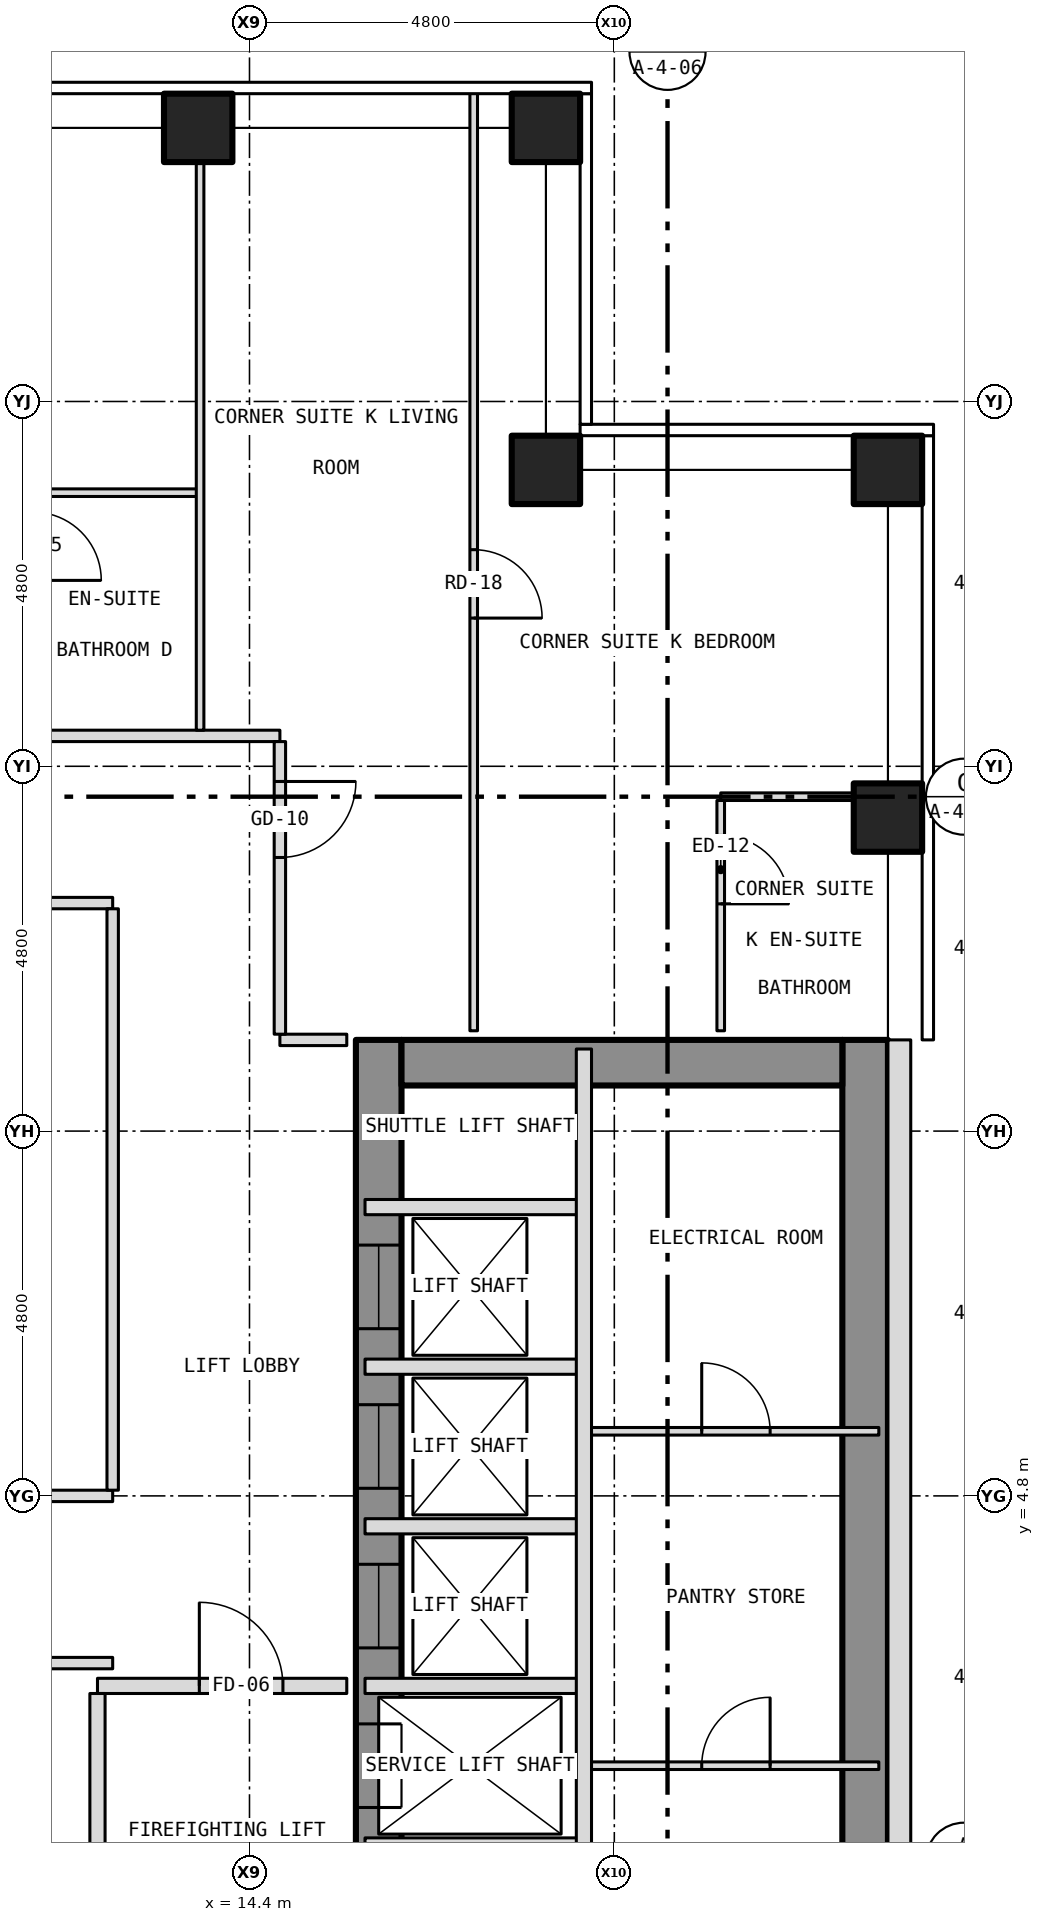
"""IFC4 building model, lengths in metres.
Left out: names, types, materials, properties, quantities, classifications, styles, units other than length and angle.
Written with IfcOpenShell. Run it as: python <this file> out.ifc"""

import sys

from ifc_helpers import new_model, si_unit, direction, frame, frame_2d, origin, origin_2d, place, context, subcontext, project, spatial, rectangle, hollow_rectangle, extrude, element, fill, save


model = new_model("IFC4")
c1 = context("Model", 3, precision=1e-05, world=origin(), true_north=direction((0.0, 1.0)))
c2 = subcontext(c1, "Body", "Model", "MODEL_VIEW")
j1 = project(units=[si_unit("LENGTHUNIT", "METRE"), si_unit("PLANEANGLEUNIT", "RADIAN")], contexts=[c1])
p1 = place(None, origin())
s1 = spatial("IfcSite", under=j1, at=p1, CompositionType="ELEMENT")
p2 = place(p1, origin())
s2 = spatial("IfcBuilding", under=s1, at=p2, CompositionType="ELEMENT")
p3 = place(p2, frame((0.0, 0.0, 110.0)))
s3 = spatial("IfcBuildingStorey", under=s2, at=p3, CompositionType="ELEMENT", Elevation=110.0)
for number, where, z_axis, x_axis in (
    (1, (13.725, 22.8, -0.15), (0.0, 0.0, 1.0), (1.0, 0.0, 0.0)),
    (2, (18.3, 22.8, -0.15), (0.0, 0.0, 1.0), (1.0, 0.0, 0.0)),
    (3, (22.8, 13.725, -0.15), (0.0, 0.0, 1.0), (1.0, 0.0, 0.0)),
    (4, (22.8, 18.3, -0.15), (0.0, 0.0, 1.0), (1.0, 0.0, 0.0)),
    (5, (18.3, 18.3, -0.15), (0.0, 0.0, 1.0), (1.0, 0.0, 0.0)),
):
    element("IfcColumn", number, at=place(p3, frame(where, z_axis=z_axis, x_axis=x_axis)), inside=s3, PredefinedType="COLUMN", context=c2, shape_type="SweptSolid", body=[
        extrude(hollow_rectangle(XDim=0.9, YDim=0.9, WallThickness=0.05, at=origin_2d()), origin(), (0.0, 0.0, 1.0), 3.5),
    ])
p4 = place(p3, frame((16.1, -10.8, 0.0), z_axis=(0.0, 0.0, 1.0), x_axis=(0.0, 1.0, 0.0)))
e6 = element("IfcWall", 6, at=p4, inside=s3, PredefinedType="SHEAR", context=c2, shape_type="SweptSolid", body=[
    extrude(rectangle(XDim=21.6, YDim=0.6, at=frame_2d((10.8, 0.0))), origin(), (0.0, 0.0, 1.0), 3.25),
])
p5 = place(p4, frame((9.4, 0.0, 0.0)))
e7 = element("IfcOpeningElement", 7, at=p5, cuts=e6, PredefinedType="OPENING", context=c2, shape_type="SweptSolid", body=[
    extrude(rectangle(XDim=1.1, YDim=2.1, at=frame_2d((0.55, 1.05))), frame((0.0, 0.312, 0.0), z_axis=(0.0, -1.0, 0.0), x_axis=(1.0, 0.0, 0.0)), (0.0, 0.0, 1.0), 0.624),
])
p6 = place(p4, frame((11.5, 0.0, 0.0)))
e8 = element("IfcOpeningElement", 8, at=p6, cuts=e6, PredefinedType="OPENING", context=c2, shape_type="SweptSolid", body=[
    extrude(rectangle(XDim=1.1, YDim=2.1, at=frame_2d((0.55, 1.05))), frame((0.0, 0.312, 0.0), z_axis=(0.0, -1.0, 0.0), x_axis=(1.0, 0.0, 0.0)), (0.0, 0.0, 1.0), 0.624),
])
p7 = place(p4, frame((13.6, 0.0, 0.0)))
e9 = element("IfcOpeningElement", 9, at=p7, cuts=e6, PredefinedType="OPENING", context=c2, shape_type="SweptSolid", body=[
    extrude(rectangle(XDim=1.1, YDim=2.1, at=frame_2d((0.55, 1.05))), frame((0.0, 0.312, 0.0), z_axis=(0.0, -1.0, 0.0), x_axis=(1.0, 0.0, 0.0)), (0.0, 0.0, 1.0), 0.624),
])
p8 = place(p4, frame((15.7, 0.0, 0.0)))
e10 = element("IfcOpeningElement", 10, at=p8, cuts=e6, PredefinedType="OPENING", context=c2, shape_type="SweptSolid", body=[
    extrude(rectangle(XDim=1.1, YDim=2.1, at=frame_2d((0.55, 1.05))), frame((0.0, 0.312, 0.0), z_axis=(0.0, -1.0, 0.0), x_axis=(1.0, 0.0, 0.0)), (0.0, 0.0, 1.0), 0.624),
])
p9 = place(p4, frame((17.8, 0.0, 0.0)))
e11 = element("IfcOpeningElement", 11, at=p9, cuts=e6, PredefinedType="OPENING", context=c2, shape_type="SweptSolid", body=[
    extrude(rectangle(XDim=1.1, YDim=2.1, at=frame_2d((0.55, 1.05))), frame((0.0, 0.312, 0.0), z_axis=(0.0, -1.0, 0.0), x_axis=(1.0, 0.0, 0.0)), (0.0, 0.0, 1.0), 0.624),
])
p10 = place(p4, frame((5.642, 0.0, 0.0)))
e12 = element("IfcOpeningElement", 12, at=p10, cuts=e6, PredefinedType="OPENING", context=c2, shape_type="SweptSolid", body=[
    extrude(rectangle(XDim=1.1, YDim=2.1, at=frame_2d((0.55, 1.05))), frame((0.0, 0.312, 0.0), z_axis=(0.0, -1.0, 0.0), x_axis=(1.0, 0.0, 0.0)), (0.0, 0.0, 1.0), 0.624),
])
p11 = place(p4, frame((7.5, 0.0, 0.0)))
e13 = element("IfcOpeningElement", 13, at=p11, cuts=e6, PredefinedType="OPENING", context=c2, shape_type="SweptSolid", body=[
    extrude(rectangle(XDim=1.1, YDim=2.1, at=frame_2d((0.55, 1.05))), frame((0.0, 0.312, 0.0), z_axis=(0.0, -1.0, 0.0), x_axis=(1.0, 0.0, 0.0)), (0.0, 0.0, 1.0), 0.624),
])
p12 = place(p3, frame((22.5, -10.8, 0.0), z_axis=(0.0, 0.0, 1.0), x_axis=(0.0, 1.0, 0.0)))
e14 = element("IfcWall", 14, at=p12, inside=s3, PredefinedType="SHEAR", context=c2, shape_type="SweptSolid", body=[
    extrude(rectangle(XDim=21.6, YDim=0.6, at=frame_2d((10.8, 0.0))), origin(), (0.0, 0.0, 1.0), 3.25),
])
p13 = place(p3, frame((16.4, 10.5, 0.0), z_axis=(0.0, 0.0, 1.0), x_axis=(1.0, 0.0, 0.0)))
e15 = element("IfcWall", 15, at=p13, inside=s3, PredefinedType="SHEAR", context=c2, shape_type="SweptSolid", body=[
    extrude(rectangle(XDim=5.8, YDim=0.6, at=frame_2d((2.9, 0.0))), origin(), (0.0, 0.0, 1.0), 3.25),
])
p14 = place(p3, frame((22.95, -10.8, 0.0), z_axis=(0.0, 0.0, 1.0), x_axis=(0.0, 1.0, 0.0)))
e16 = element("IfcWall", 16, at=p14, inside=s3, PredefinedType="SOLIDWALL", context=c2, shape_type="SweptSolid", body=[
    extrude(rectangle(XDim=21.6, YDim=0.3, at=frame_2d((10.8, 0.0))), origin(), (0.0, 0.0, 1.0), 3.5),
])
p15 = place(p14, frame((2.95, 0.0, 1.0)))
e17 = element("IfcOpeningElement", 17, at=p15, cuts=e16, PredefinedType="OPENING", context=c2, shape_type="SweptSolid", body=[
    extrude(rectangle(XDim=0.6, YDim=1.5, at=frame_2d((0.3, 0.75))), frame((0.0, 0.162, 0.0), z_axis=(0.0, -1.0, 0.0), x_axis=(1.0, 0.0, 0.0)), (0.0, 0.0, 1.0), 0.324),
])
p16 = place(p3, frame((15.92, 0.2, 0.0), z_axis=(0.0, 0.0, 1.0), x_axis=(1.0, 0.0, 0.0)))
e18 = element("IfcWall", 18, at=p16, inside=s3, PredefinedType="PARTITIONING", context=c2, shape_type="SweptSolid", body=[
    extrude(rectangle(XDim=2.88, YDim=0.2, at=frame_2d((1.44, 0.0))), origin(), (0.0, 0.0, 1.0), 3.25),
])
p17 = place(p3, frame((18.8, 1.25, 0.0), z_axis=(0.0, 0.0, 1.0), x_axis=(1.0, 0.0, 0.0)))
e19 = element("IfcWall", 19, at=p17, inside=s3, PredefinedType="PARTITIONING", context=c2, shape_type="SweptSolid", body=[
    extrude(rectangle(XDim=3.88, YDim=0.1, at=frame_2d((1.94, 0.0))), origin(), (0.0, 0.0, 1.0), 3.25),
])
p18 = place(p17, frame((1.55, 0.0, 0.0)))
e20 = element("IfcOpeningElement", 20, at=p18, cuts=e19, PredefinedType="OPENING", context=c2, shape_type="SweptSolid", body=[
    extrude(rectangle(XDim=0.9, YDim=2.1, at=frame_2d((0.45, 1.05))), frame((0.0, 0.062, 0.0), z_axis=(0.0, -1.0, 0.0), x_axis=(1.0, 0.0, 0.0)), (0.0, 0.0, 1.0), 0.124),
])
p19 = place(p3, frame((12.4, 2.3, 0.0), z_axis=(0.0, 0.0, 1.0), x_axis=(1.0, 0.0, 0.0)))
e21 = element("IfcWall", 21, at=p19, inside=s3, PredefinedType="PARTITIONING", context=c2, shape_type="SweptSolid", body=[
    extrude(rectangle(XDim=3.28, YDim=0.2, at=frame_2d((1.64, 0.0))), origin(), (0.0, 0.0, 1.0), 3.35),
])
p20 = place(p19, frame((1.34, 0.0, 0.0)))
e22 = element("IfcOpeningElement", 22, at=p20, cuts=e21, PredefinedType="OPENING", context=c2, shape_type="SweptSolid", body=[
    extrude(rectangle(XDim=1.1, YDim=2.1, at=frame_2d((0.55, 1.05))), frame((0.0, 0.112, 0.0), z_axis=(0.0, -1.0, 0.0), x_axis=(1.0, 0.0, 0.0)), (0.0, 0.0, 1.0), 0.224),
])
p21 = place(p3, frame((15.92, 2.3, 0.0), z_axis=(0.0, 0.0, 1.0), x_axis=(1.0, 0.0, 0.0)))
e23 = element("IfcWall", 23, at=p21, inside=s3, PredefinedType="PARTITIONING", context=c2, shape_type="SweptSolid", body=[
    extrude(rectangle(XDim=2.88, YDim=0.2, at=frame_2d((1.44, 0.0))), origin(), (0.0, 0.0, 1.0), 3.25),
])
p22 = place(p3, frame((6.3, 2.6, 0.0), z_axis=(0.0, 0.0, 1.0), x_axis=(1.0, 0.0, 0.0)))
e24 = element("IfcWall", 24, at=p22, inside=s3, PredefinedType="PARTITIONING", context=c2, shape_type="SweptSolid", body=[
    extrude(rectangle(XDim=6.3, YDim=0.15, at=frame_2d((3.15, 0.0))), origin(), (0.0, 0.0, 1.0), 3.35),
])
p23 = place(p3, frame((15.92, 4.4, 0.0), z_axis=(0.0, 0.0, 1.0), x_axis=(1.0, 0.0, 0.0)))
e25 = element("IfcWall", 25, at=p23, inside=s3, PredefinedType="PARTITIONING", context=c2, shape_type="SweptSolid", body=[
    extrude(rectangle(XDim=2.88, YDim=0.2, at=frame_2d((1.44, 0.0))), origin(), (0.0, 0.0, 1.0), 3.25),
])
p24 = place(p3, frame((6.3, 4.8, 0.0), z_axis=(0.0, 0.0, 1.0), x_axis=(1.0, 0.0, 0.0)))
e26 = element("IfcWall", 26, at=p24, inside=s3, PredefinedType="PARTITIONING", context=c2, shape_type="SweptSolid", body=[
    extrude(rectangle(XDim=6.3, YDim=0.15, at=frame_2d((3.15, 0.0))), origin(), (0.0, 0.0, 1.0), 3.35),
])
p25 = place(p3, frame((18.8, 5.65, 0.0), z_axis=(0.0, 0.0, 1.0), x_axis=(1.0, 0.0, 0.0)))
e27 = element("IfcWall", 27, at=p25, inside=s3, PredefinedType="PARTITIONING", context=c2, shape_type="SweptSolid", body=[
    extrude(rectangle(XDim=3.88, YDim=0.1, at=frame_2d((1.94, 0.0))), origin(), (0.0, 0.0, 1.0), 3.25),
])
p26 = place(p25, frame((1.55, 0.0, 0.0)))
e28 = element("IfcOpeningElement", 28, at=p26, cuts=e27, PredefinedType="OPENING", context=c2, shape_type="SweptSolid", body=[
    extrude(rectangle(XDim=0.9, YDim=2.1, at=frame_2d((0.45, 1.05))), frame((0.0, 0.062, 0.0), z_axis=(0.0, -1.0, 0.0), x_axis=(1.0, 0.0, 0.0)), (0.0, 0.0, 1.0), 0.124),
])
for number, where, z_axis, x_axis in (
    (29, (15.92, 6.5, 0.0), (0.0, 0.0, 1.0), (1.0, 0.0, 0.0)),
    (30, (15.92, 8.6, 0.0), (0.0, 0.0, 1.0), (1.0, 0.0, 0.0)),
):
    element("IfcWall", number, at=place(p3, frame(where, z_axis=z_axis, x_axis=x_axis)), inside=s3, PredefinedType="PARTITIONING", context=c2, shape_type="SweptSolid", body=[
        extrude(rectangle(XDim=2.88, YDim=0.2, at=frame_2d((1.44, 0.0))), origin(), (0.0, 0.0, 1.0), 3.25),
    ])
p27 = place(p3, frame((14.8, 10.8, 0.0), z_axis=(0.0, 0.0, 1.0), x_axis=(1.0, 0.0, 0.0)))
e31 = element("IfcWall", 31, at=p27, inside=s3, PredefinedType="PARTITIONING", context=c2, shape_type="SweptSolid", body=[
    extrude(rectangle(XDim=0.88, YDim=0.15, at=frame_2d((0.44, 0.0))), origin(), (0.0, 0.0, 1.0), 3.35),
])
p28 = place(p3, frame((6.3, 12.6, 0.0), z_axis=(0.0, 0.0, 1.0), x_axis=(1.0, 0.0, 0.0)))
e32 = element("IfcWall", 32, at=p28, inside=s3, PredefinedType="PARTITIONING", context=c2, shape_type="SweptSolid", body=[
    extrude(rectangle(XDim=6.3, YDim=0.15, at=frame_2d((3.15, 0.0))), origin(), (0.0, 0.0, 1.0), 3.35),
])
p29 = place(p3, frame((20.6, 14.0, 0.0), z_axis=(0.0, 0.0, 1.0), x_axis=(1.0, 0.0, 0.0)))
e33 = element("IfcWall", 33, at=p29, inside=s3, PredefinedType="PARTITIONING", context=c2, shape_type="SweptSolid", body=[
    extrude(rectangle(XDim=2.08, YDim=0.1, at=frame_2d((1.04, 0.0))), origin(), (0.0, 0.0, 1.0), 3.35),
])
p30 = place(p3, frame((-14.8, 14.8, 0.0), z_axis=(0.0, 0.0, 1.0), x_axis=(1.0, 0.0, 0.0)))
e34 = element("IfcWall", 34, at=p30, inside=s3, PredefinedType="PARTITIONING", context=c2, shape_type="SweptSolid", body=[
    extrude(rectangle(XDim=29.6, YDim=0.15, at=frame_2d((14.8, 0.0))), origin(), (0.0, 0.0, 1.0), 3.35),
])
p31 = place(p30, frame((2.913, 0.0, 0.0)))
e35 = element("IfcOpeningElement", 35, at=p31, cuts=e34, PredefinedType="OPENING", context=c2, shape_type="SweptSolid", body=[
    extrude(rectangle(XDim=0.9, YDim=2.1, at=frame_2d((0.45, 1.05))), frame((0.0, 0.087, 0.0), z_axis=(0.0, -1.0, 0.0), x_axis=(1.0, 0.0, 0.0)), (0.0, 0.0, 1.0), 0.174),
])
p32 = place(p30, frame((7.481, 0.0, 0.0)))
e36 = element("IfcOpeningElement", 36, at=p32, cuts=e34, PredefinedType="OPENING", context=c2, shape_type="SweptSolid", body=[
    extrude(rectangle(XDim=1.0, YDim=2.1, at=frame_2d((0.5, 1.05))), frame((0.0, 0.087, 0.0), z_axis=(0.0, -1.0, 0.0), x_axis=(1.0, 0.0, 0.0)), (0.0, 0.0, 1.0), 0.174),
])
p33 = place(p30, frame((19.104, 0.0, 0.0)))
e37 = element("IfcOpeningElement", 37, at=p33, cuts=e34, PredefinedType="OPENING", context=c2, shape_type="SweptSolid", body=[
    extrude(rectangle(XDim=1.0, YDim=2.1, at=frame_2d((0.5, 1.05))), frame((0.0, 0.087, 0.0), z_axis=(0.0, -1.0, 0.0), x_axis=(1.0, 0.0, 0.0)), (0.0, 0.0, 1.0), 0.174),
])
p34 = place(p30, frame((23.494, 0.0, 0.0)))
e38 = element("IfcOpeningElement", 38, at=p34, cuts=e34, PredefinedType="OPENING", context=c2, shape_type="SweptSolid", body=[
    extrude(rectangle(XDim=1.0, YDim=2.1, at=frame_2d((0.5, 1.05))), frame((0.0, 0.087, 0.0), z_axis=(0.0, -1.0, 0.0), x_axis=(1.0, 0.0, 0.0)), (0.0, 0.0, 1.0), 0.174),
])
p35 = place(p3, frame((11.55, 18.0, 0.0), z_axis=(0.0, 0.0, 1.0), x_axis=(1.0, 0.0, 0.0)))
e39 = element("IfcWall", 39, at=p35, inside=s3, PredefinedType="PARTITIONING", context=c2, shape_type="SweptSolid", body=[
    extrude(rectangle(XDim=2.2, YDim=0.1, at=frame_2d((1.1, 0.0))), origin(), (0.0, 0.0, 1.0), 3.35),
])
p36 = place(p3, frame((12.4, -1.8, 0.0), z_axis=(0.0, 0.0, 1.0), x_axis=(0.0, 1.0, 0.0)))
e40 = element("IfcWall", 40, at=p36, inside=s3, PredefinedType="PARTITIONING", context=c2, shape_type="SweptSolid", body=[
    extrude(rectangle(XDim=4.0, YDim=0.2, at=frame_2d((2.0, 0.0))), origin(), (0.0, 0.0, 1.0), 3.35),
])
p37 = place(p3, frame((12.6, 4.875, 0.0), z_axis=(0.0, 0.0, 1.0), x_axis=(0.0, 1.0, 0.0)))
e41 = element("IfcWall", 41, at=p37, inside=s3, PredefinedType="PARTITIONING", context=c2, shape_type="SweptSolid", body=[
    extrude(rectangle(XDim=7.65, YDim=0.15, at=frame_2d((3.825, 0.0))), origin(), (0.0, 0.0, 1.0), 3.35),
])
p38 = place(p3, frame((13.75, 14.875, 0.0), z_axis=(0.0, 0.0, 1.0), x_axis=(0.0, 1.0, 0.0)))
e42 = element("IfcWall", 42, at=p38, inside=s3, PredefinedType="PARTITIONING", context=c2, shape_type="SweptSolid", body=[
    extrude(rectangle(XDim=7.805, YDim=0.1, at=frame_2d((3.902, 0.0))), origin(), (0.0, 0.0, 1.0), 3.35),
])
p39 = place(p3, frame((14.8, 10.875, 0.0), z_axis=(0.0, 0.0, 1.0), x_axis=(0.0, 1.0, 0.0)))
e43 = element("IfcWall", 43, at=p39, inside=s3, PredefinedType="PARTITIONING", context=c2, shape_type="SweptSolid", body=[
    extrude(rectangle(XDim=3.85, YDim=0.15, at=frame_2d((1.925, 0.0))), origin(), (0.0, 0.0, 1.0), 3.35),
])
p40 = place(p39, frame((2.325, 0.0, 0.0)))
e44 = element("IfcOpeningElement", 44, at=p40, cuts=e43, PredefinedType="OPENING", context=c2, shape_type="SweptSolid", body=[
    extrude(rectangle(XDim=1.0, YDim=2.1, at=frame_2d((0.5, 1.05))), frame((0.0, 0.087, 0.0), z_axis=(0.0, -1.0, 0.0), x_axis=(1.0, 0.0, 0.0)), (0.0, 0.0, 1.0), 0.174),
])
p41 = place(p3, frame((17.35, 10.92, 0.0), z_axis=(0.0, 0.0, 1.0), x_axis=(0.0, 1.0, 0.0)))
e45 = element("IfcWall", 45, at=p41, inside=s3, PredefinedType="PARTITIONING", context=c2, shape_type="SweptSolid", body=[
    extrude(rectangle(XDim=12.36, YDim=0.1, at=frame_2d((6.18, 0.0))), origin(), (0.0, 0.0, 1.0), 3.35),
])
p42 = place(p41, frame((5.43, 0.0, 0.0)))
e46 = element("IfcOpeningElement", 46, at=p42, cuts=e45, PredefinedType="OPENING", context=c2, shape_type="SweptSolid", body=[
    extrude(rectangle(XDim=0.9, YDim=2.1, at=frame_2d((0.45, 1.05))), frame((0.0, 0.062, 0.0), z_axis=(0.0, -1.0, 0.0), x_axis=(1.0, 0.0, 0.0)), (0.0, 0.0, 1.0), 0.124),
])
p43 = place(p3, frame((18.8, -1.8, 0.0), z_axis=(0.0, 0.0, 1.0), x_axis=(0.0, 1.0, 0.0)))
e47 = element("IfcWall", 47, at=p43, inside=s3, PredefinedType="PARTITIONING", context=c2, shape_type="SweptSolid", body=[
    extrude(rectangle(XDim=12.48, YDim=0.2, at=frame_2d((6.24, 0.0))), origin(), (0.0, 0.0, 1.0), 3.25),
])
p44 = place(p3, frame((20.6, 10.92, 0.0), z_axis=(0.0, 0.0, 1.0), x_axis=(0.0, 1.0, 0.0)))
e48 = element("IfcWall", 48, at=p44, inside=s3, PredefinedType="PARTITIONING", context=c2, shape_type="SweptSolid", body=[
    extrude(rectangle(XDim=3.03, YDim=0.1, at=frame_2d((1.515, 0.0))), origin(), (0.0, 0.0, 1.0), 3.35),
])
p45 = place(p44, frame((1.67, 0.0, 0.0)))
e49 = element("IfcOpeningElement", 49, at=p45, cuts=e48, PredefinedType="OPENING", context=c2, shape_type="SweptSolid", body=[
    extrude(rectangle(XDim=0.9, YDim=2.1, at=frame_2d((0.45, 1.05))), frame((0.0, 0.062, 0.0), z_axis=(0.0, -1.0, 0.0), x_axis=(1.0, 0.0, 0.0)), (0.0, 0.0, 1.0), 0.124),
])
p46 = place(p6, origin())
e50 = element("IfcDoor", 50, at=p46, inside=s3, OperationType="SLIDING_TO_LEFT", PredefinedType="DOOR", context=c2, shape_type="SweptSolid", body=[
    extrude(rectangle(XDim=1.1, YDim=2.1, at=frame_2d((0.55, 1.05))), frame((0.0, 0.025, 0.0), z_axis=(0.0, -1.0, 0.0), x_axis=(1.0, 0.0, 0.0)), (0.0, 0.0, 1.0), 0.05),
])
fill(e8, e50)
p47 = place(p7, origin())
e51 = element("IfcDoor", 51, at=p47, inside=s3, OperationType="SLIDING_TO_LEFT", PredefinedType="DOOR", context=c2, shape_type="SweptSolid", body=[
    extrude(rectangle(XDim=1.1, YDim=2.1, at=frame_2d((0.55, 1.05))), frame((0.0, 0.025, 0.0), z_axis=(0.0, -1.0, 0.0), x_axis=(1.0, 0.0, 0.0)), (0.0, 0.0, 1.0), 0.05),
])
fill(e9, e51)
p48 = place(p8, origin())
e52 = element("IfcDoor", 52, at=p48, inside=s3, OperationType="SLIDING_TO_LEFT", PredefinedType="DOOR", context=c2, shape_type="SweptSolid", body=[
    extrude(rectangle(XDim=1.1, YDim=2.1, at=frame_2d((0.55, 1.05))), frame((0.0, 0.025, 0.0), z_axis=(0.0, -1.0, 0.0), x_axis=(1.0, 0.0, 0.0)), (0.0, 0.0, 1.0), 0.05),
])
fill(e10, e52)
p49 = place(p9, origin())
e53 = element("IfcDoor", 53, at=p49, inside=s3, OperationType="SLIDING_TO_LEFT", PredefinedType="DOOR", context=c2, shape_type="SweptSolid", body=[
    extrude(rectangle(XDim=1.1, YDim=2.1, at=frame_2d((0.55, 1.05))), frame((0.0, 0.025, 0.0), z_axis=(0.0, -1.0, 0.0), x_axis=(1.0, 0.0, 0.0)), (0.0, 0.0, 1.0), 0.05),
])
fill(e11, e53)
p50 = place(p18, origin())
e54 = element("IfcDoor", 54, at=p50, inside=s3, OperationType="SINGLE_SWING_RIGHT", PredefinedType="DOOR", context=c2, shape_type="SweptSolid", body=[
    extrude(rectangle(XDim=0.9, YDim=2.1, at=frame_2d((0.45, 1.05))), frame((0.0, 0.025, 0.0), z_axis=(0.0, -1.0, 0.0), x_axis=(1.0, 0.0, 0.0)), (0.0, 0.0, 1.0), 0.05),
])
fill(e20, e54)
p51 = place(p26, origin())
e55 = element("IfcDoor", 55, at=p51, inside=s3, OperationType="SINGLE_SWING_LEFT", PredefinedType="DOOR", context=c2, shape_type="SweptSolid", body=[
    extrude(rectangle(XDim=0.9, YDim=2.1, at=frame_2d((0.45, 1.05))), frame((0.0, 0.025, 0.0), z_axis=(0.0, -1.0, 0.0), x_axis=(1.0, 0.0, 0.0)), (0.0, 0.0, 1.0), 0.05),
])
fill(e28, e55)
p52 = place(p20, origin())
e56 = element("IfcDoor", 56, at=p52, inside=s3, OperationType="SINGLE_SWING_LEFT", PredefinedType="DOOR", context=c2, shape_type="SweptSolid", body=[
    extrude(rectangle(XDim=1.1, YDim=2.1, at=frame_2d((0.55, 1.05))), frame((0.0, 0.025, 0.0), z_axis=(0.0, -1.0, 0.0), x_axis=(1.0, 0.0, 0.0)), (0.0, 0.0, 1.0), 0.05),
])
fill(e22, e56)
p53 = place(p40, origin())
e57 = element("IfcDoor", 57, at=p53, inside=s3, OperationType="SINGLE_SWING_RIGHT", PredefinedType="DOOR", context=c2, shape_type="SweptSolid", body=[
    extrude(rectangle(XDim=1.0, YDim=2.1, at=frame_2d((0.5, 1.05))), frame((0.0, 0.025, 0.0), z_axis=(0.0, -1.0, 0.0), x_axis=(1.0, 0.0, 0.0)), (0.0, 0.0, 1.0), 0.05),
])
fill(e44, e57)
p54 = place(p42, origin())
e58 = element("IfcDoor", 58, at=p54, inside=s3, OperationType="SINGLE_SWING_LEFT", PredefinedType="DOOR", context=c2, shape_type="SweptSolid", body=[
    extrude(rectangle(XDim=0.9, YDim=2.1, at=frame_2d((0.45, 1.05))), frame((0.0, 0.025, 0.0), z_axis=(0.0, -1.0, 0.0), x_axis=(1.0, 0.0, 0.0)), (0.0, 0.0, 1.0), 0.05),
])
fill(e46, e58)
p55 = place(p45, origin())
e59 = element("IfcDoor", 59, at=p55, inside=s3, OperationType="SINGLE_SWING_LEFT", PredefinedType="DOOR", context=c2, shape_type="SweptSolid", body=[
    extrude(rectangle(XDim=0.9, YDim=2.1, at=frame_2d((0.45, 1.05))), frame((0.0, 0.025, 0.0), z_axis=(0.0, -1.0, 0.0), x_axis=(1.0, 0.0, 0.0)), (0.0, 0.0, 1.0), 0.05),
])
fill(e49, e59)
save(model, sys.argv[1])
